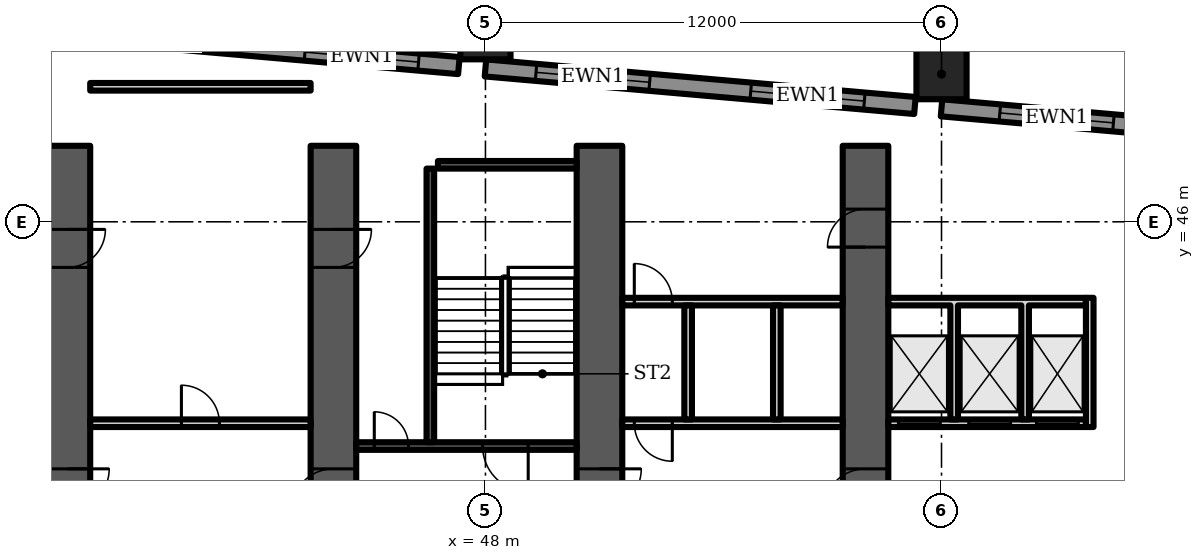
"""IFC4 building model, lengths in metres.
Left out: names, types, materials, properties, quantities, classifications, styles, units other than length and angle.
Written with IfcOpenShell. Run it as: python <this file> out.ifc"""

import sys

from ifc_helpers import new_model, si_unit, direction, frame, frame_2d, origin, origin_2d, place, context, subcontext, project, spatial, polyline, rectangle, outline, extrude, element, fill, save


model = new_model("IFC4")
c1 = context("Model", 3, precision=1e-05, world=origin(), true_north=direction((0.0, 1.0)))
c2 = subcontext(c1, "Body", "Model", "MODEL_VIEW")
j1 = project(units=[si_unit("LENGTHUNIT", "METRE"), si_unit("PLANEANGLEUNIT", "RADIAN")], contexts=[c1])
p1 = place(None, origin())
s1 = spatial("IfcSite", under=j1, at=p1, CompositionType="ELEMENT")
p2 = place(p1, origin())
s2 = spatial("IfcBuilding", under=s1, at=p2, CompositionType="ELEMENT")
p3 = place(p2, frame((0.0, 0.0, 8.0)))
s3 = spatial("IfcBuildingStorey", under=s2, at=p3, CompositionType="ELEMENT", Elevation=8.0)
for number, where, z_axis, x_axis in (
    (1, (48.0, 50.935, 0.0), (0.0, 0.0, 1.0), (1.0, 0.0, 0.0)),
    (2, (60.0, 49.885, 0.0), (0.0, 0.0, 1.0), (1.0, 0.0, 0.0)),
):
    element("IfcColumn", number, at=place(p3, frame(where, z_axis=z_axis, x_axis=x_axis)), inside=s3, PredefinedType="COLUMN", context=c2, shape_type="SweptSolid", body=[
        extrude(rectangle(XDim=1.32, YDim=1.32, at=origin_2d()), origin(), (0.0, 0.0, 1.0), 7.0),
    ])
p4 = place(p3, frame((66.058, 48.469, 0.0), z_axis=(0.0, 0.0, 1.0), x_axis=(-0.996195, 0.087158, 0.0)))
e3 = element("IfcWall", 3, at=p4, inside=s3, PredefinedType="SOLIDWALL", context=c2, shape_type="SweptSolid", body=[
    extrude(rectangle(XDim=6.081, YDim=0.45, at=frame_2d((3.041, 0.0))), origin(), (0.0, 0.0, 1.0), 6.7),
])
p5 = place(p4, frame((1.541, 0.0, 1.0)))
e4 = element("IfcOpeningElement", 4, at=p5, cuts=e3, PredefinedType="OPENING", context=c2, shape_type="SweptSolid", body=[
    extrude(rectangle(XDim=3.0, YDim=4.7, at=frame_2d((1.5, 2.35))), frame((0.0, 0.235, 0.0), z_axis=(0.0, -1.0, 0.0), x_axis=(1.0, 0.0, 0.0)), (0.0, 0.0, 1.0), 0.47),
])
p6 = place(p3, frame((59.301, 49.06, 0.0), z_axis=(0.0, 0.0, 1.0), x_axis=(-0.996195, 0.087145, 0.0)))
e5 = element("IfcWall", 5, at=p6, inside=s3, PredefinedType="SOLIDWALL", context=c2, shape_type="SweptSolid", body=[
    extrude(rectangle(XDim=11.344, YDim=0.45, at=frame_2d((5.672, 0.0))), origin(), (0.0, 0.0, 1.0), 6.7),
])
p7 = place(p6, frame((1.336, 0.0, 1.0)))
e6 = element("IfcOpeningElement", 6, at=p7, cuts=e5, PredefinedType="OPENING", context=c2, shape_type="SweptSolid", body=[
    extrude(rectangle(XDim=3.0, YDim=4.7, at=frame_2d((1.5, 2.35))), frame((0.0, 0.235, 0.0), z_axis=(0.0, -1.0, 0.0), x_axis=(1.0, 0.0, 0.0)), (0.0, 0.0, 1.0), 0.47),
])
p8 = place(p6, frame((7.008, 0.0, 1.0)))
e7 = element("IfcOpeningElement", 7, at=p8, cuts=e5, PredefinedType="OPENING", context=c2, shape_type="SweptSolid", body=[
    extrude(rectangle(XDim=3.0, YDim=4.7, at=frame_2d((1.5, 2.35))), frame((0.0, 0.235, 0.0), z_axis=(0.0, -1.0, 0.0), x_axis=(1.0, 0.0, 0.0)), (0.0, 0.0, 1.0), 0.47),
])
p9 = place(p3, frame((47.301, 50.11, 0.0), z_axis=(0.0, 0.0, 1.0), x_axis=(-0.996195, 0.087143, 0.0)))
e8 = element("IfcWall", 8, at=p9, inside=s3, PredefinedType="SOLIDWALL", context=c2, shape_type="SweptSolid", body=[
    extrude(rectangle(XDim=10.26, YDim=0.45, at=frame_2d((5.13, 0.0))), origin(), (0.0, 0.0, 1.0), 6.7),
])
p10 = place(p9, frame((1.065, 0.0, 1.0)))
e9 = element("IfcOpeningElement", 9, at=p10, cuts=e8, PredefinedType="OPENING", context=c2, shape_type="SweptSolid", body=[
    extrude(rectangle(XDim=3.0, YDim=4.7, at=frame_2d((1.5, 2.35))), frame((0.0, 0.235, 0.0), z_axis=(0.0, -1.0, 0.0), x_axis=(1.0, 0.0, 0.0)), (0.0, 0.0, 1.0), 0.47),
])
p11 = place(p9, frame((6.195, 0.0, 1.0)))
e10 = element("IfcOpeningElement", 10, at=p11, cuts=e8, PredefinedType="OPENING", context=c2, shape_type="SweptSolid", body=[
    extrude(rectangle(XDim=3.0, YDim=4.7, at=frame_2d((1.5, 2.35))), frame((0.0, 0.235, 0.0), z_axis=(0.0, -1.0, 0.0), x_axis=(1.0, 0.0, 0.0)), (0.0, 0.0, 1.0), 0.47),
])
p12 = place(p3, frame((37.0, 35.2, 0.0), z_axis=(0.0, 0.0, 1.0), x_axis=(0.0, 1.0, 0.0)))
e11 = element("IfcWall", 11, at=p12, inside=s3, PredefinedType="SHEAR", context=c2, shape_type="SweptSolid", body=[
    extrude(rectangle(XDim=12.8, YDim=1.2, at=frame_2d((6.4, 0.0))), origin(), (0.0, 0.0, 1.0), 6.7),
])
p13 = place(p12, frame((3.2, 0.0, 0.0)))
e12 = element("IfcOpeningElement", 12, at=p13, cuts=e11, PredefinedType="OPENING", context=c2, shape_type="SweptSolid", body=[
    extrude(rectangle(XDim=1.1, YDim=2.1, at=frame_2d((0.55, 1.05))), frame((0.0, 0.61, 0.0), z_axis=(0.0, -1.0, 0.0), x_axis=(1.0, 0.0, 0.0)), (0.0, 0.0, 1.0), 1.22),
])
p14 = place(p12, frame((9.6, 0.0, 0.0)))
e13 = element("IfcOpeningElement", 13, at=p14, cuts=e11, PredefinedType="OPENING", context=c2, shape_type="SweptSolid", body=[
    extrude(rectangle(XDim=1.0, YDim=2.1, at=frame_2d((0.5, 1.05))), frame((0.0, 0.61, 0.0), z_axis=(0.0, -1.0, 0.0), x_axis=(1.0, 0.0, 0.0)), (0.0, 0.0, 1.0), 1.22),
])
p15 = place(p3, frame((44.0, 35.2, 0.0), z_axis=(0.0, 0.0, 1.0), x_axis=(0.0, 1.0, 0.0)))
e14 = element("IfcWall", 14, at=p15, inside=s3, PredefinedType="SHEAR", context=c2, shape_type="SweptSolid", body=[
    extrude(rectangle(XDim=12.8, YDim=1.2, at=frame_2d((6.4, 0.0))), origin(), (0.0, 0.0, 1.0), 6.7),
])
p16 = place(p15, frame((3.2, 0.0, 0.0)))
e15 = element("IfcOpeningElement", 15, at=p16, cuts=e14, PredefinedType="OPENING", context=c2, shape_type="SweptSolid", body=[
    extrude(rectangle(XDim=1.1, YDim=2.1, at=frame_2d((0.55, 1.05))), frame((0.0, 0.61, 0.0), z_axis=(0.0, -1.0, 0.0), x_axis=(1.0, 0.0, 0.0)), (0.0, 0.0, 1.0), 1.22),
])
p17 = place(p15, frame((9.6, 0.0, 0.0)))
e16 = element("IfcOpeningElement", 16, at=p17, cuts=e14, PredefinedType="OPENING", context=c2, shape_type="SweptSolid", body=[
    extrude(rectangle(XDim=1.0, YDim=2.1, at=frame_2d((0.5, 1.05))), frame((0.0, 0.61, 0.0), z_axis=(0.0, -1.0, 0.0), x_axis=(1.0, 0.0, 0.0)), (0.0, 0.0, 1.0), 1.22),
])
p18 = place(p3, frame((51.0, 35.2, 0.0), z_axis=(0.0, 0.0, 1.0), x_axis=(0.0, 1.0, 0.0)))
e17 = element("IfcWall", 17, at=p18, inside=s3, PredefinedType="SHEAR", context=c2, shape_type="SweptSolid", body=[
    extrude(rectangle(XDim=12.8, YDim=1.2, at=frame_2d((6.4, 0.0))), origin(), (0.0, 0.0, 1.0), 6.7),
])
p19 = place(p18, frame((3.2, 0.0, 0.0)))
e18 = element("IfcOpeningElement", 18, at=p19, cuts=e17, PredefinedType="OPENING", context=c2, shape_type="SweptSolid", body=[
    extrude(rectangle(XDim=1.1, YDim=2.1, at=frame_2d((0.55, 1.05))), frame((0.0, 0.61, 0.0), z_axis=(0.0, -1.0, 0.0), x_axis=(1.0, 0.0, 0.0)), (0.0, 0.0, 1.0), 1.22),
])
p20 = place(p3, frame((58.0, 35.2, 0.0), z_axis=(0.0, 0.0, 1.0), x_axis=(0.0, 1.0, 0.0)))
e19 = element("IfcWall", 19, at=p20, inside=s3, PredefinedType="SHEAR", context=c2, shape_type="SweptSolid", body=[
    extrude(rectangle(XDim=12.8, YDim=1.2, at=frame_2d((6.4, 0.0))), origin(), (0.0, 0.0, 1.0), 6.7),
])
p21 = place(p20, frame((10.134, 0.0, 0.0)))
e20 = element("IfcOpeningElement", 20, at=p21, cuts=e19, PredefinedType="OPENING", context=c2, shape_type="SweptSolid", body=[
    extrude(rectangle(XDim=1.0, YDim=2.1, at=frame_2d((0.5, 1.05))), frame((0.0, 0.61, 0.0), z_axis=(0.0, -1.0, 0.0), x_axis=(1.0, 0.0, 0.0)), (0.0, 0.0, 1.0), 1.22),
])
p22 = place(p20, frame((3.2, 0.0, 0.0)))
e21 = element("IfcOpeningElement", 21, at=p22, cuts=e19, PredefinedType="OPENING", context=c2, shape_type="SweptSolid", body=[
    extrude(rectangle(XDim=1.1, YDim=2.1, at=frame_2d((0.55, 1.05))), frame((0.0, 0.61, 0.0), z_axis=(0.0, -1.0, 0.0), x_axis=(1.0, 0.0, 0.0)), (0.0, 0.0, 1.0), 1.22),
])
p23 = place(p3, frame((37.6, 40.7, 0.0), z_axis=(0.0, 0.0, 1.0), x_axis=(1.0, 0.0, 0.0)))
e22 = element("IfcWall", 22, at=p23, inside=s3, PredefinedType="PARTITIONING", context=c2, shape_type="SweptSolid", body=[
    extrude(rectangle(XDim=5.8, YDim=0.2, at=frame_2d((2.9, 0.0))), origin(), (0.0, 0.0, 1.0), 6.7),
])
p24 = place(p23, frame((2.4, 0.0, 0.0)))
e23 = element("IfcOpeningElement", 23, at=p24, cuts=e22, PredefinedType="OPENING", context=c2, shape_type="SweptSolid", body=[
    extrude(rectangle(XDim=1.0, YDim=2.1, at=frame_2d((0.5, 1.05))), frame((0.0, 0.11, 0.0), z_axis=(0.0, -1.0, 0.0), x_axis=(1.0, 0.0, 0.0)), (0.0, 0.0, 1.0), 0.22),
])
p25 = place(p3, frame((37.6, 49.552, 0.0), z_axis=(0.0, 0.0, 1.0), x_axis=(1.0, 0.0, 0.0)))
e24 = element("IfcWall", 24, at=p25, inside=s3, PredefinedType="PARTITIONING", context=c2, shape_type="SweptSolid", body=[
    extrude(rectangle(XDim=5.8, YDim=0.2, at=frame_2d((2.9, 0.0))), origin(), (0.0, 0.0, 1.0), 6.7),
])
p26 = place(p3, frame((44.6, 40.1, 0.0), z_axis=(0.0, 0.0, 1.0), x_axis=(1.0, 0.0, 0.0)))
e25 = element("IfcWall", 25, at=p26, inside=s3, PredefinedType="SHEAR", context=c2, shape_type="SweptSolid", body=[
    extrude(rectangle(XDim=5.8, YDim=0.2, at=frame_2d((2.9, 0.0))), origin(), (0.0, 0.0, 1.0), 6.7),
])
p27 = place(p26, frame((3.325, 0.0, 0.0)))
e26 = element("IfcOpeningElement", 26, at=p27, cuts=e25, PredefinedType="OPENING", context=c2, shape_type="SweptSolid", body=[
    extrude(rectangle(XDim=1.2, YDim=2.1, at=frame_2d((0.6, 1.05))), frame((0.0, 0.11, 0.0), z_axis=(0.0, -1.0, 0.0), x_axis=(1.0, 0.0, 0.0)), (0.0, 0.0, 1.0), 0.22),
])
p28 = place(p26, frame((0.475, 0.0, 0.0)))
e27 = element("IfcOpeningElement", 27, at=p28, cuts=e25, PredefinedType="OPENING", context=c2, shape_type="SweptSolid", body=[
    extrude(rectangle(XDim=0.9, YDim=2.1, at=frame_2d((0.45, 1.05))), frame((0.0, 0.11, 0.0), z_axis=(0.0, -1.0, 0.0), x_axis=(1.0, 0.0, 0.0)), (0.0, 0.0, 1.0), 0.22),
])
p29 = place(p3, frame((46.55, 40.2, 0.0), z_axis=(0.0, 0.0, 1.0), x_axis=(0.0, 1.0, 0.0)))
e28 = element("IfcWall", 28, at=p29, inside=s3, PredefinedType="SHEAR", context=c2, shape_type="SweptSolid", body=[
    extrude(rectangle(XDim=7.2, YDim=0.2, at=frame_2d((3.6, 0.0))), origin(), (0.0, 0.0, 1.0), 6.7),
])
p30 = place(p3, frame((46.75, 47.5, 0.0), z_axis=(0.0, 0.0, 1.0), x_axis=(1.0, 0.0, 0.0)))
e29 = element("IfcWall", 29, at=p30, inside=s3, PredefinedType="SHEAR", context=c2, shape_type="SweptSolid", body=[
    extrude(rectangle(XDim=3.65, YDim=0.2, at=frame_2d((1.825, 0.0))), origin(), (0.0, 0.0, 1.0), 6.7),
])
p31 = place(p3, frame((51.6, 40.7, 0.0), z_axis=(0.0, 0.0, 1.0), x_axis=(1.0, 0.0, 0.0)))
e30 = element("IfcWall", 30, at=p31, inside=s3, PredefinedType="PARTITIONING", context=c2, shape_type="SweptSolid", body=[
    extrude(rectangle(XDim=5.8, YDim=0.2, at=frame_2d((2.9, 0.0))), origin(), (0.0, 0.0, 1.0), 6.7),
])
p32 = place(p31, frame((0.317, 0.0, 0.0)))
e31 = element("IfcOpeningElement", 31, at=p32, cuts=e30, PredefinedType="OPENING", context=c2, shape_type="SweptSolid", body=[
    extrude(rectangle(XDim=1.0, YDim=2.1, at=frame_2d((0.5, 1.05))), frame((0.0, 0.11, 0.0), z_axis=(0.0, -1.0, 0.0), x_axis=(1.0, 0.0, 0.0)), (0.0, 0.0, 1.0), 0.22),
])
p33 = place(p3, frame((51.6, 43.9, 0.0), z_axis=(0.0, 0.0, 1.0), x_axis=(1.0, 0.0, 0.0)))
e32 = element("IfcWall", 32, at=p33, inside=s3, PredefinedType="PARTITIONING", context=c2, shape_type="SweptSolid", body=[
    extrude(rectangle(XDim=5.8, YDim=0.2, at=frame_2d((2.9, 0.0))), origin(), (0.0, 0.0, 1.0), 6.7),
])
p34 = place(p33, frame((0.317, 0.0, 0.0)))
e33 = element("IfcOpeningElement", 33, at=p34, cuts=e32, PredefinedType="OPENING", context=c2, shape_type="SweptSolid", body=[
    extrude(rectangle(XDim=1.0, YDim=2.1, at=frame_2d((0.5, 1.05))), frame((0.0, 0.11, 0.0), z_axis=(0.0, -1.0, 0.0), x_axis=(1.0, 0.0, 0.0)), (0.0, 0.0, 1.0), 0.22),
])
p35 = place(p3, frame((0.0, 0.0, -0.0)))
e34 = element("IfcWall", 34, at=p35, inside=s3, PredefinedType="PARTITIONING", context=c2, shape_type="SweptSolid", body=[
    extrude(outline(polyline([(53.233, 40.8), (53.233, 43.8), (53.433, 43.8), (53.433, 40.8), (53.233, 40.8)])), origin(), (0.0, 0.0, 1.0), 6.7),
])
p36 = place(p3, frame((0.0, 0.0, -0.0)))
e35 = element("IfcWall", 35, at=p36, inside=s3, PredefinedType="PARTITIONING", context=c2, shape_type="SweptSolid", body=[
    extrude(outline(polyline([(55.567, 40.8), (55.567, 43.8), (55.767, 43.8), (55.767, 40.8), (55.567, 40.8)])), origin(), (0.0, 0.0, 1.0), 6.7),
])
p37 = place(p3, frame((58.6, 40.7, 0.0), z_axis=(0.0, 0.0, 1.0), x_axis=(1.0, 0.0, 0.0)))
e36 = element("IfcWall", 36, at=p37, inside=s3, PredefinedType="PARTITIONING", context=c2, shape_type="SweptSolid", body=[
    extrude(rectangle(XDim=5.2, YDim=0.2, at=frame_2d((2.6, 0.0))), origin(), (0.0, 0.0, 1.0), 6.7),
])
p38 = place(p37, frame((0.267, 0.0, 0.0)))
e37 = element("IfcOpeningElement", 37, at=p38, cuts=e36, PredefinedType="OPENING", context=c2, shape_type="SweptSolid", body=[
    extrude(rectangle(XDim=1.1, YDim=2.1, at=frame_2d((0.55, 1.05))), frame((0.0, 0.11, 0.0), z_axis=(0.0, -1.0, 0.0), x_axis=(1.0, 0.0, 0.0)), (0.0, 0.0, 1.0), 0.22),
])
p39 = place(p37, frame((2.117, 0.0, 0.0)))
e38 = element("IfcOpeningElement", 38, at=p39, cuts=e36, PredefinedType="OPENING", context=c2, shape_type="SweptSolid", body=[
    extrude(rectangle(XDim=1.1, YDim=2.1, at=frame_2d((0.55, 1.05))), frame((0.0, 0.11, 0.0), z_axis=(0.0, -1.0, 0.0), x_axis=(1.0, 0.0, 0.0)), (0.0, 0.0, 1.0), 0.22),
])
p40 = place(p37, frame((3.9, 0.0, 0.0)))
e39 = element("IfcOpeningElement", 39, at=p40, cuts=e36, PredefinedType="OPENING", context=c2, shape_type="SweptSolid", body=[
    extrude(rectangle(XDim=1.1, YDim=2.1, at=frame_2d((0.55, 1.05))), frame((0.0, 0.11, 0.0), z_axis=(0.0, -1.0, 0.0), x_axis=(1.0, 0.0, 0.0)), (0.0, 0.0, 1.0), 0.22),
])
p41 = place(p3, frame((0.0, 0.0, -0.0)))
e40 = element("IfcWall", 40, at=p41, inside=s3, PredefinedType="PARTITIONING", context=c2, shape_type="SweptSolid", body=[
    extrude(outline(polyline([(60.433, 40.8), (60.233, 40.8), (60.233, 43.8), (58.6, 43.8), (58.6, 44.0), (63.8, 44.0), (63.8, 43.8), (62.3, 43.8), (62.3, 40.8), (62.1, 40.8), (62.1, 43.8), (60.433, 43.8), (60.433, 40.8)])), origin(), (0.0, 0.0, 1.0), 6.7),
])
p42 = place(p3, frame((63.9, 40.6, 0.0), z_axis=(0.0, 0.0, 1.0), x_axis=(0.0, 1.0, 0.0)))
e41 = element("IfcWall", 41, at=p42, inside=s3, PredefinedType="PARTITIONING", context=c2, shape_type="SweptSolid", body=[
    extrude(rectangle(XDim=3.4, YDim=0.2, at=frame_2d((1.7, 0.0))), origin(), (0.0, 0.0, 1.0), 6.7),
])
p43 = place(p5, origin())
e42 = element("IfcWindow", 42, at=p43, inside=s3, PartitioningType="SINGLE_PANEL", PredefinedType="WINDOW", context=c2, shape_type="SweptSolid", body=[
    extrude(rectangle(XDim=3.0, YDim=4.7, at=frame_2d((1.5, 2.35))), frame((0.0, 0.105, 0.0), z_axis=(0.0, -1.0, 0.0), x_axis=(1.0, 0.0, 0.0)), (0.0, 0.0, 1.0), 0.06),
])
fill(e4, e42)
p44 = place(p7, origin())
e43 = element("IfcWindow", 43, at=p44, inside=s3, PartitioningType="SINGLE_PANEL", PredefinedType="WINDOW", context=c2, shape_type="SweptSolid", body=[
    extrude(rectangle(XDim=3.0, YDim=4.7, at=frame_2d((1.5, 2.35))), frame((0.0, 0.105, 0.0), z_axis=(0.0, -1.0, 0.0), x_axis=(1.0, 0.0, 0.0)), (0.0, 0.0, 1.0), 0.06),
])
fill(e6, e43)
p45 = place(p8, origin())
e44 = element("IfcWindow", 44, at=p45, inside=s3, PartitioningType="SINGLE_PANEL", PredefinedType="WINDOW", context=c2, shape_type="SweptSolid", body=[
    extrude(rectangle(XDim=3.0, YDim=4.7, at=frame_2d((1.5, 2.35))), frame((0.0, 0.105, 0.0), z_axis=(0.0, -1.0, 0.0), x_axis=(1.0, 0.0, 0.0)), (0.0, 0.0, 1.0), 0.06),
])
fill(e7, e44)
p46 = place(p10, origin())
e45 = element("IfcWindow", 45, at=p46, inside=s3, PartitioningType="SINGLE_PANEL", PredefinedType="WINDOW", context=c2, shape_type="SweptSolid", body=[
    extrude(rectangle(XDim=3.0, YDim=4.7, at=frame_2d((1.5, 2.35))), frame((0.0, 0.105, 0.0), z_axis=(0.0, -1.0, 0.0), x_axis=(1.0, 0.0, 0.0)), (0.0, 0.0, 1.0), 0.06),
])
fill(e9, e45)
p47 = place(p24, origin())
e46 = element("IfcDoor", 46, at=p47, inside=s3, OperationType="SINGLE_SWING_LEFT", PredefinedType="DOOR", context=c2, shape_type="SweptSolid", body=[
    extrude(rectangle(XDim=1.0, YDim=2.1, at=frame_2d((0.5, 1.05))), frame((0.0, 0.025, 0.0), z_axis=(0.0, -1.0, 0.0), x_axis=(1.0, 0.0, 0.0)), (0.0, 0.0, 1.0), 0.05),
])
fill(e23, e46)
p48 = place(p27, origin())
e47 = element("IfcDoor", 47, at=p48, inside=s3, OperationType="SINGLE_SWING_RIGHT", PredefinedType="DOOR", context=c2, shape_type="SweptSolid", body=[
    extrude(rectangle(XDim=1.2, YDim=2.1, at=frame_2d((0.6, 1.05))), frame((0.0, 0.025, 0.0), z_axis=(0.0, -1.0, 0.0), x_axis=(1.0, 0.0, 0.0)), (0.0, 0.0, 1.0), 0.05),
])
fill(e26, e47)
p49 = place(p28, origin())
e48 = element("IfcDoor", 48, at=p49, inside=s3, OperationType="SINGLE_SWING_LEFT", PredefinedType="DOOR", context=c2, shape_type="SweptSolid", body=[
    extrude(rectangle(XDim=0.9, YDim=2.1, at=frame_2d((0.45, 1.05))), frame((0.0, 0.025, 0.0), z_axis=(0.0, -1.0, 0.0), x_axis=(1.0, 0.0, 0.0)), (0.0, 0.0, 1.0), 0.05),
])
fill(e27, e48)
p50 = place(p32, origin())
e49 = element("IfcDoor", 49, at=p50, inside=s3, OperationType="SINGLE_SWING_RIGHT", PredefinedType="DOOR", context=c2, shape_type="SweptSolid", body=[
    extrude(rectangle(XDim=1.0, YDim=2.1, at=frame_2d((0.5, 1.05))), frame((0.0, 0.025, 0.0), z_axis=(0.0, -1.0, 0.0), x_axis=(1.0, 0.0, 0.0)), (0.0, 0.0, 1.0), 0.05),
])
fill(e31, e49)
p51 = place(p34, origin())
e50 = element("IfcDoor", 50, at=p51, inside=s3, OperationType="SINGLE_SWING_LEFT", PredefinedType="DOOR", context=c2, shape_type="SweptSolid", body=[
    extrude(rectangle(XDim=1.0, YDim=2.1, at=frame_2d((0.5, 1.05))), frame((0.0, 0.025, 0.0), z_axis=(0.0, -1.0, 0.0), x_axis=(1.0, 0.0, 0.0)), (0.0, 0.0, 1.0), 0.05),
])
fill(e33, e50)
p52 = place(p38, origin())
e51 = element("IfcDoor", 51, at=p52, inside=s3, OperationType="DOUBLE_DOOR_SLIDING", PredefinedType="DOOR", context=c2, shape_type="SweptSolid", body=[
    extrude(rectangle(XDim=1.1, YDim=2.1, at=frame_2d((0.55, 1.05))), frame((0.0, 0.025, 0.0), z_axis=(0.0, -1.0, 0.0), x_axis=(1.0, 0.0, 0.0)), (0.0, 0.0, 1.0), 0.05),
])
fill(e37, e51)
p53 = place(p39, origin())
e52 = element("IfcDoor", 52, at=p53, inside=s3, OperationType="DOUBLE_DOOR_SLIDING", PredefinedType="DOOR", context=c2, shape_type="SweptSolid", body=[
    extrude(rectangle(XDim=1.1, YDim=2.1, at=frame_2d((0.55, 1.05))), frame((0.0, 0.025, 0.0), z_axis=(0.0, -1.0, 0.0), x_axis=(1.0, 0.0, 0.0)), (0.0, 0.0, 1.0), 0.05),
])
fill(e38, e52)
p54 = place(p40, origin())
e53 = element("IfcDoor", 53, at=p54, inside=s3, OperationType="DOUBLE_DOOR_SLIDING", PredefinedType="DOOR", context=c2, shape_type="SweptSolid", body=[
    extrude(rectangle(XDim=1.1, YDim=2.1, at=frame_2d((0.55, 1.05))), frame((0.0, 0.025, 0.0), z_axis=(0.0, -1.0, 0.0), x_axis=(1.0, 0.0, 0.0)), (0.0, 0.0, 1.0), 0.05),
])
fill(e39, e53)
p55 = place(p21, origin())
e54 = element("IfcDoor", 54, at=p55, inside=s3, OperationType="SINGLE_SWING_LEFT", PredefinedType="DOOR", context=c2, shape_type="SweptSolid", body=[
    extrude(rectangle(XDim=1.0, YDim=2.1, at=frame_2d((0.5, 1.05))), frame((0.0, 0.6, 0.0), z_axis=(0.0, -1.0, 0.0), x_axis=(1.0, 0.0, 0.0)), (0.0, 0.0, 1.0), 1.199),
])
fill(e20, e54)
p56 = place(p13, origin())
e55 = element("IfcDoor", 55, at=p56, inside=s3, OperationType="SINGLE_SWING_RIGHT", PredefinedType="DOOR", context=c2, shape_type="SweptSolid", body=[
    extrude(rectangle(XDim=1.1, YDim=2.1, at=frame_2d((0.55, 1.05))), frame((0.0, 0.025, 0.0), z_axis=(0.0, -1.0, 0.0), x_axis=(1.0, 0.0, 0.0)), (0.0, 0.0, 1.0), 0.05),
])
fill(e12, e55)
p57 = place(p14, origin())
e56 = element("IfcDoor", 56, at=p57, inside=s3, OperationType="SINGLE_SWING_RIGHT", PredefinedType="DOOR", context=c2, shape_type="SweptSolid", body=[
    extrude(rectangle(XDim=1.0, YDim=2.1, at=frame_2d((0.5, 1.05))), frame((0.0, 0.6, 0.0), z_axis=(0.0, -1.0, 0.0), x_axis=(1.0, 0.0, 0.0)), (0.0, 0.0, 1.0), 1.199),
])
fill(e13, e56)
p58 = place(p16, origin())
e57 = element("IfcDoor", 57, at=p58, inside=s3, OperationType="SINGLE_SWING_LEFT", PredefinedType="DOOR", context=c2, shape_type="SweptSolid", body=[
    extrude(rectangle(XDim=1.1, YDim=2.1, at=frame_2d((0.55, 1.05))), frame((0.0, 0.025, 0.0), z_axis=(0.0, -1.0, 0.0), x_axis=(1.0, 0.0, 0.0)), (0.0, 0.0, 1.0), 0.05),
])
fill(e15, e57)
p59 = place(p17, origin())
e58 = element("IfcDoor", 58, at=p59, inside=s3, OperationType="SINGLE_SWING_RIGHT", PredefinedType="DOOR", context=c2, shape_type="SweptSolid", body=[
    extrude(rectangle(XDim=1.0, YDim=2.1, at=frame_2d((0.5, 1.05))), frame((0.0, 0.6, 0.0), z_axis=(0.0, -1.0, 0.0), x_axis=(1.0, 0.0, 0.0)), (0.0, 0.0, 1.0), 1.199),
])
fill(e16, e58)
p60 = place(p19, origin())
e59 = element("IfcDoor", 59, at=p60, inside=s3, OperationType="SINGLE_SWING_RIGHT", PredefinedType="DOOR", context=c2, shape_type="SweptSolid", body=[
    extrude(rectangle(XDim=1.1, YDim=2.1, at=frame_2d((0.55, 1.05))), frame((0.0, 0.025, 0.0), z_axis=(0.0, -1.0, 0.0), x_axis=(1.0, 0.0, 0.0)), (0.0, 0.0, 1.0), 0.05),
])
fill(e18, e59)
p61 = place(p22, origin())
e60 = element("IfcDoor", 60, at=p61, inside=s3, OperationType="SINGLE_SWING_LEFT", PredefinedType="DOOR", context=c2, shape_type="SweptSolid", body=[
    extrude(rectangle(XDim=1.1, YDim=2.1, at=frame_2d((0.55, 1.05))), frame((0.0, 0.025, 0.0), z_axis=(0.0, -1.0, 0.0), x_axis=(1.0, 0.0, 0.0)), (0.0, 0.0, 1.0), 0.05),
])
fill(e21, e60)
save(model, sys.argv[1])
